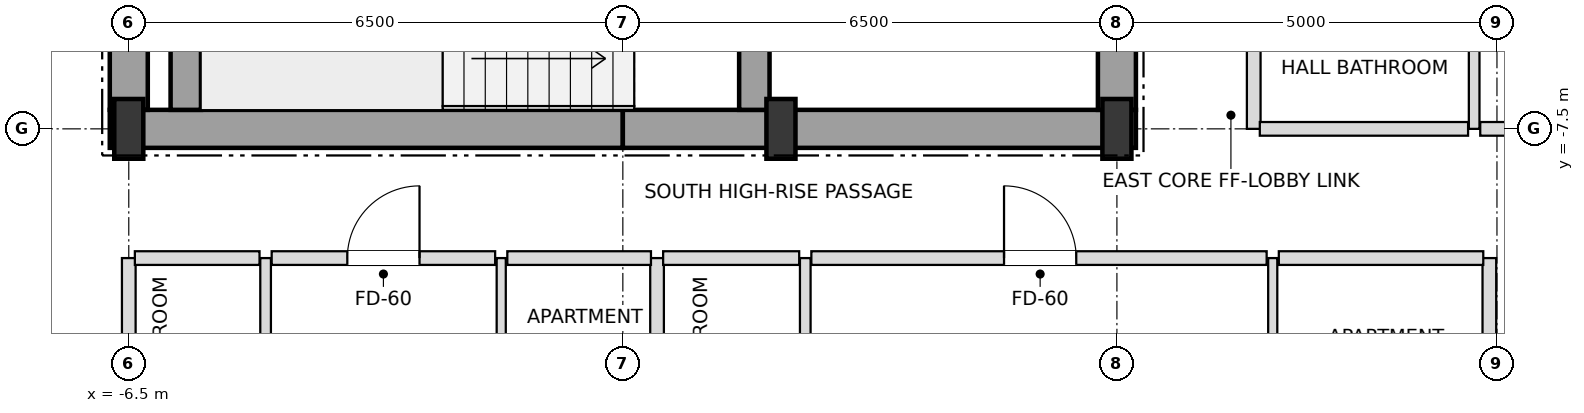
"""IFC4 building model, lengths in metres.
Left out: names, types, materials, properties, quantities, classifications, styles, units other than length and angle.
Written with IfcOpenShell. Run it as: python <this file> out.ifc"""

import sys

from ifc_helpers import new_model, si_unit, direction, frame, frame_2d, origin, origin_2d, place, context, subcontext, project, spatial, rectangle, i_section, extrude, element, fill, save


model = new_model("IFC4")
c1 = context("Model", 3, precision=1e-05, world=origin(), true_north=direction((0.0, 1.0)))
c2 = subcontext(c1, "Body", "Model", "MODEL_VIEW")
j1 = project(units=[si_unit("LENGTHUNIT", "METRE"), si_unit("PLANEANGLEUNIT", "RADIAN")], contexts=[c1])
p1 = place(None, origin())
s1 = spatial("IfcSite", under=j1, at=p1, CompositionType="ELEMENT")
p2 = place(p1, origin())
s2 = spatial("IfcBuilding", under=s1, at=p2, CompositionType="ELEMENT")
p3 = place(p2, frame((0.0, 0.0, 243.9)))
s3 = spatial("IfcBuildingStorey", under=s2, at=p3, CompositionType="ELEMENT", Elevation=243.9)
for number, where, z_axis, x_axis in (
    (1, (-6.5, -7.5, 0.0), (0.0, 0.0, 1.0), (1.0, 0.0, 0.0)),
    (2, (2.08, -7.5, 0.0), (0.0, 0.0, 1.0), (1.0, 0.0, 0.0)),
    (3, (6.5, -7.5, 0.0), (0.0, 0.0, 1.0), (1.0, 0.0, 0.0)),
):
    element("IfcColumn", number, at=place(p3, frame(where, z_axis=z_axis, x_axis=x_axis)), inside=s3, PredefinedType="COLUMN", context=c2, shape_type="SweptSolid", body=[
        extrude(i_section(OverallWidth=0.382, OverallDepth=0.786, WebThickness=0.02, FlangeThickness=0.033, at=origin_2d()), origin(), (0.0, 0.0, 1.0), 3.6),
    ])
for number, where, z_axis, x_axis in (
    (4, (-6.75, -7.5, 0.0), (0.0, 0.0, 1.0), (1.0, 0.0, 0.0)),
    (5, (0.0, -7.5, 0.0), (0.0, 0.0, 1.0), (1.0, 0.0, 0.0)),
):
    element("IfcWall", number, at=place(p3, frame(where, z_axis=z_axis, x_axis=x_axis)), inside=s3, PredefinedType="SHEAR", context=c2, shape_type="SweptSolid", body=[
        extrude(rectangle(XDim=6.75, YDim=0.5, at=frame_2d((3.375, 0.0))), origin(), (0.0, 0.0, 1.0), 3.38),
    ])
p4 = place(p3, frame((-6.5, -7.25, 0.0), z_axis=(0.0, 0.0, 1.0), x_axis=(0.0, 1.0, 0.0)))
e6 = element("IfcWall", 6, at=p4, inside=s3, PredefinedType="SHEAR", context=c2, shape_type="SweptSolid", body=[
    extrude(rectangle(XDim=3.55, YDim=0.5, at=frame_2d((1.775, 0.0))), origin(), (0.0, 0.0, 1.0), 3.38),
])
p5 = place(p3, frame((6.5, -7.25, 0.0), z_axis=(0.0, 0.0, 1.0), x_axis=(0.0, 1.0, 0.0)))
e7 = element("IfcWall", 7, at=p5, inside=s3, PredefinedType="SHEAR", context=c2, shape_type="SweptSolid", body=[
    extrude(rectangle(XDim=5.75, YDim=0.5, at=frame_2d((2.875, 0.0))), origin(), (0.0, 0.0, 1.0), 3.38),
])
p6 = place(p5, frame((0.85, 0.0, 0.0)))
e8 = element("IfcOpeningElement", 8, at=p6, cuts=e7, PredefinedType="OPENING", context=c2, shape_type="SweptSolid", body=[
    extrude(rectangle(XDim=1.05, YDim=2.15, at=frame_2d((0.525, 1.075))), frame((0.0, 0.26, 0.0), z_axis=(0.0, -1.0, 0.0), x_axis=(1.0, 0.0, 0.0)), (0.0, 0.0, 1.0), 0.52),
])
p7 = place(p3, frame((-5.75, -7.25, 0.0), z_axis=(0.0, 0.0, 1.0), x_axis=(0.0, 1.0, 0.0)))
e9 = element("IfcWall", 9, at=p7, inside=s3, PredefinedType="SHEAR", context=c2, shape_type="SweptSolid", body=[
    extrude(rectangle(XDim=2.9, YDim=0.4, at=frame_2d((1.45, 0.0))), origin(), (0.0, 0.0, 1.0), 3.38),
])
p8 = place(p3, frame((1.73, -7.25, 0.0), z_axis=(0.0, 0.0, 1.0), x_axis=(0.0, 1.0, 0.0)))
e10 = element("IfcWall", 10, at=p8, inside=s3, PredefinedType="SHEAR", context=c2, shape_type="SweptSolid", body=[
    extrude(rectangle(XDim=3.3, YDim=0.4, at=frame_2d((1.65, 0.0))), origin(), (0.0, 0.0, 1.0), 3.38),
])
p9 = place(p8, frame((0.9, 0.0, 0.0)))
e11 = element("IfcOpeningElement", 11, at=p9, cuts=e10, PredefinedType="OPENING", context=c2, shape_type="SweptSolid", body=[
    extrude(rectangle(XDim=1.05, YDim=2.15, at=frame_2d((0.525, 1.075))), frame((0.0, 0.21, 0.0), z_axis=(0.0, -1.0, 0.0), x_axis=(1.0, 0.0, 0.0)), (0.0, 0.0, 1.0), 0.42),
])
p10 = place(p3, frame((-6.5, -19.9, 0.0), z_axis=(0.0, 0.0, 1.0), x_axis=(0.0, 1.0, 0.0)))
e12 = element("IfcWall", 12, at=p10, inside=s3, PredefinedType="PARTITIONING", context=c2, shape_type="SweptSolid", body=[
    extrude(rectangle(XDim=10.7, YDim=0.18, at=frame_2d((5.35, 0.0))), origin(), (0.0, 0.0, 1.0), 2.826),
])
p11 = place(p3, frame((-4.7, -13.9, 0.0), z_axis=(0.0, 0.0, 1.0), x_axis=(0.0, 1.0, 0.0)))
e13 = element("IfcWall", 13, at=p11, inside=s3, PredefinedType="PARTITIONING", context=c2, shape_type="SweptSolid", body=[
    extrude(rectangle(XDim=4.7, YDim=0.14, at=frame_2d((2.35, 0.0))), origin(), (0.0, 0.0, 1.0), 3.38),
])
p12 = place(p11, frame((1.9, 0.0, 0.0)))
e14 = element("IfcOpeningElement", 14, at=p12, cuts=e13, PredefinedType="OPENING", context=c2, shape_type="SweptSolid", body=[
    extrude(rectangle(XDim=0.9, YDim=2.1, at=frame_2d((0.45, 1.05))), frame((0.0, 0.08, 0.0), z_axis=(0.0, -1.0, 0.0), x_axis=(1.0, 0.0, 0.0)), (0.0, 0.0, 1.0), 0.16),
])
p13 = place(p3, frame((-1.6, -13.9, 0.0), z_axis=(0.0, 0.0, 1.0), x_axis=(0.0, 1.0, 0.0)))
e15 = element("IfcWall", 15, at=p13, inside=s3, PredefinedType="PARTITIONING", context=c2, shape_type="SweptSolid", body=[
    extrude(rectangle(XDim=4.7, YDim=0.12, at=frame_2d((2.35, 0.0))), origin(), (0.0, 0.0, 1.0), 3.38),
])
p14 = place(p13, frame((1.875, 0.0, 0.0)))
e16 = element("IfcOpeningElement", 16, at=p14, cuts=e15, PredefinedType="OPENING", context=c2, shape_type="SweptSolid", body=[
    extrude(rectangle(XDim=0.95, YDim=2.1, at=frame_2d((0.475, 1.05))), frame((0.0, 0.07, 0.0), z_axis=(0.0, -1.0, 0.0), x_axis=(1.0, 0.0, 0.0)), (0.0, 0.0, 1.0), 0.14),
])
p15 = place(p3, frame((0.45, -19.9, 0.0), z_axis=(0.0, 0.0, 1.0), x_axis=(0.0, 1.0, 0.0)))
e17 = element("IfcWall", 17, at=p15, inside=s3, PredefinedType="PARTITIONING", context=c2, shape_type="SweptSolid", body=[
    extrude(rectangle(XDim=10.7, YDim=0.18, at=frame_2d((5.35, 0.0))), origin(), (0.0, 0.0, 1.0), 3.018),
])
p16 = place(p3, frame((2.4, -13.9, 0.0), z_axis=(0.0, 0.0, 1.0), x_axis=(0.0, 1.0, 0.0)))
e18 = element("IfcWall", 18, at=p16, inside=s3, PredefinedType="PARTITIONING", context=c2, shape_type="SweptSolid", body=[
    extrude(rectangle(XDim=4.7, YDim=0.14, at=frame_2d((2.35, 0.0))), origin(), (0.0, 0.0, 1.0), 3.38),
])
p17 = place(p16, frame((1.9, 0.0, 0.0)))
e19 = element("IfcOpeningElement", 19, at=p17, cuts=e18, PredefinedType="OPENING", context=c2, shape_type="SweptSolid", body=[
    extrude(rectangle(XDim=0.9, YDim=2.1, at=frame_2d((0.45, 1.05))), frame((0.0, 0.08, 0.0), z_axis=(0.0, -1.0, 0.0), x_axis=(1.0, 0.0, 0.0)), (0.0, 0.0, 1.0), 0.16),
])
p18 = place(p3, frame((8.3, -7.5, 0.0), z_axis=(0.0, 0.0, 1.0), x_axis=(0.0, 1.0, 0.0)))
e20 = element("IfcWall", 20, at=p18, inside=s3, PredefinedType="PARTITIONING", context=c2, shape_type="SweptSolid", body=[
    extrude(rectangle(XDim=15.0, YDim=0.18, at=frame_2d((7.5, 0.0))), origin(), (0.0, 0.0, 1.0), 3.38),
])
p19 = place(p18, frame((2.355, 0.0, 0.0)))
e21 = element("IfcOpeningElement", 21, at=p19, cuts=e20, PredefinedType="OPENING", context=c2, shape_type="SweptSolid", body=[
    extrude(rectangle(XDim=0.95, YDim=2.15, at=frame_2d((0.475, 1.075))), frame((0.0, 0.1, 0.0), z_axis=(0.0, -1.0, 0.0), x_axis=(1.0, 0.0, 0.0)), (0.0, 0.0, 1.0), 0.2),
])
p20 = place(p3, frame((8.55, -19.9, 0.0), z_axis=(0.0, 0.0, 1.0), x_axis=(0.0, 1.0, 0.0)))
e22 = element("IfcWall", 22, at=p20, inside=s3, PredefinedType="PARTITIONING", context=c2, shape_type="SweptSolid", body=[
    extrude(rectangle(XDim=10.7, YDim=0.12, at=frame_2d((5.35, 0.0))), origin(), (0.0, 0.0, 1.0), 2.826),
])
p21 = place(p20, frame((7.875, 0.0, 0.0)))
e23 = element("IfcOpeningElement", 23, at=p21, cuts=e22, PredefinedType="OPENING", context=c2, shape_type="SweptSolid", body=[
    extrude(rectangle(XDim=0.95, YDim=2.1, at=frame_2d((0.475, 1.05))), frame((0.0, 0.07, 0.0), z_axis=(0.0, -1.0, 0.0), x_axis=(1.0, 0.0, 0.0)), (0.0, 0.0, 1.0), 0.14),
])
p22 = place(p20, frame((2.55, 0.0, 0.0)))
e24 = element("IfcOpeningElement", 24, at=p22, cuts=e22, PredefinedType="OPENING", context=c2, shape_type="SweptSolid", body=[
    extrude(rectangle(XDim=0.9, YDim=2.1, at=frame_2d((0.45, 1.05))), frame((0.0, 0.07, 0.0), z_axis=(0.0, -1.0, 0.0), x_axis=(1.0, 0.0, 0.0)), (0.0, 0.0, 1.0), 0.14),
])
p23 = place(p3, frame((11.2, -7.5, 0.0), z_axis=(0.0, 0.0, 1.0), x_axis=(0.0, 1.0, 0.0)))
e25 = element("IfcWall", 25, at=p23, inside=s3, PredefinedType="PARTITIONING", context=c2, shape_type="SweptSolid", body=[
    extrude(rectangle(XDim=15.0, YDim=0.14, at=frame_2d((7.5, 0.0))), origin(), (0.0, 0.0, 1.0), 3.38),
])
p24 = place(p23, frame((3.475, 0.0, 0.0)))
e26 = element("IfcOpeningElement", 26, at=p24, cuts=e25, PredefinedType="OPENING", context=c2, shape_type="SweptSolid", body=[
    extrude(rectangle(XDim=0.95, YDim=2.1, at=frame_2d((0.475, 1.05))), frame((0.0, 0.08, 0.0), z_axis=(0.0, -1.0, 0.0), x_axis=(1.0, 0.0, 0.0)), (0.0, 0.0, 1.0), 0.16),
])
p25 = place(p3, frame((11.4, -14.27, 0.0), z_axis=(0.0, 0.0, 1.0), x_axis=(0.0, 1.0, 0.0)))
e27 = element("IfcWall", 27, at=p25, inside=s3, PredefinedType="PARTITIONING", context=c2, shape_type="SweptSolid", body=[
    extrude(rectangle(XDim=5.07, YDim=0.18, at=frame_2d((2.535, 0.0))), origin(), (0.0, 0.0, 1.0), 2.748),
])
p26 = place(p3, frame((-6.42, -9.2, 0.0), z_axis=(0.0, 0.0, 1.0), x_axis=(1.0, 0.0, 0.0)))
e28 = element("IfcWall", 28, at=p26, inside=s3, PredefinedType="PARTITIONING", context=c2, shape_type="SweptSolid", body=[
    extrude(rectangle(XDim=1.64, YDim=0.18, at=frame_2d((0.82, 0.0))), origin(), (0.0, 0.0, 1.0), 3.38),
])
p27 = place(p3, frame((-4.62, -9.2, 0.0), z_axis=(0.0, 0.0, 1.0), x_axis=(1.0, 0.0, 0.0)))
e29 = element("IfcWall", 29, at=p27, inside=s3, PredefinedType="PARTITIONING", context=c2, shape_type="SweptSolid", body=[
    extrude(rectangle(XDim=2.94, YDim=0.18, at=frame_2d((1.47, 0.0))), origin(), (0.0, 0.0, 1.0), 3.38),
])
p28 = place(p27, frame((0.995, 0.0, 0.0)))
e30 = element("IfcOpeningElement", 30, at=p28, cuts=e29, PredefinedType="OPENING", context=c2, shape_type="SweptSolid", body=[
    extrude(rectangle(XDim=0.95, YDim=2.15, at=frame_2d((0.475, 1.075))), frame((0.0, 0.1, 0.0), z_axis=(0.0, -1.0, 0.0), x_axis=(1.0, 0.0, 0.0)), (0.0, 0.0, 1.0), 0.2),
])
p29 = place(p3, frame((-1.52, -9.2, 0.0), z_axis=(0.0, 0.0, 1.0), x_axis=(1.0, 0.0, 0.0)))
e31 = element("IfcWall", 31, at=p29, inside=s3, PredefinedType="PARTITIONING", context=c2, shape_type="SweptSolid", body=[
    extrude(rectangle(XDim=1.89, YDim=0.18, at=frame_2d((0.945, 0.0))), origin(), (0.0, 0.0, 1.0), 3.38),
])
p30 = place(p3, frame((0.53, -9.2, 0.0), z_axis=(0.0, 0.0, 1.0), x_axis=(1.0, 0.0, 0.0)))
e32 = element("IfcWall", 32, at=p30, inside=s3, PredefinedType="PARTITIONING", context=c2, shape_type="SweptSolid", body=[
    extrude(rectangle(XDim=1.79, YDim=0.18, at=frame_2d((0.895, 0.0))), origin(), (0.0, 0.0, 1.0), 3.38),
])
p31 = place(p3, frame((2.48, -9.2, 0.0), z_axis=(0.0, 0.0, 1.0), x_axis=(1.0, 0.0, 0.0)))
e33 = element("IfcWall", 33, at=p31, inside=s3, PredefinedType="PARTITIONING", context=c2, shape_type="SweptSolid", body=[
    extrude(rectangle(XDim=5.99, YDim=0.18, at=frame_2d((2.995, 0.0))), origin(), (0.0, 0.0, 1.0), 2.826),
])
p32 = place(p31, frame((2.535, 0.0, 0.0)))
e34 = element("IfcOpeningElement", 34, at=p32, cuts=e33, PredefinedType="OPENING", context=c2, shape_type="SweptSolid", body=[
    extrude(rectangle(XDim=0.95, YDim=2.15, at=frame_2d((0.475, 1.075))), frame((0.0, 0.1, 0.0), z_axis=(0.0, -1.0, 0.0), x_axis=(1.0, 0.0, 0.0)), (0.0, 0.0, 1.0), 0.2),
])
p33 = place(p3, frame((8.63, -9.2, 0.0), z_axis=(0.0, 0.0, 1.0), x_axis=(1.0, 0.0, 0.0)))
e35 = element("IfcWall", 35, at=p33, inside=s3, PredefinedType="PARTITIONING", context=c2, shape_type="SweptSolid", body=[
    extrude(rectangle(XDim=2.69, YDim=0.18, at=frame_2d((1.345, 0.0))), origin(), (0.0, 0.0, 1.0), 3.38),
])
p34 = place(p3, frame((8.38, -7.5, 0.0), z_axis=(0.0, 0.0, 1.0), x_axis=(1.0, 0.0, 0.0)))
e36 = element("IfcWall", 36, at=p34, inside=s3, PredefinedType="PARTITIONING", context=c2, shape_type="SweptSolid", body=[
    extrude(rectangle(XDim=2.74, YDim=0.18, at=frame_2d((1.37, 0.0))), origin(), (0.0, 0.0, 1.0), 2.826),
])
p35 = place(p3, frame((11.28, -7.5, 0.0), z_axis=(0.0, 0.0, 1.0), x_axis=(1.0, 0.0, 0.0)))
e37 = element("IfcWall", 37, at=p35, inside=s3, PredefinedType="PARTITIONING", context=c2, shape_type="SweptSolid", body=[
    extrude(rectangle(XDim=5.62, YDim=0.18, at=frame_2d((2.81, 0.0))), origin(), (0.0, 0.0, 1.0), 2.826),
])
p36 = place(p28, origin())
e38 = element("IfcDoor", 38, at=p36, inside=s3, OperationType="SINGLE_SWING_RIGHT", PredefinedType="DOOR", context=c2, shape_type="SweptSolid", body=[
    extrude(rectangle(XDim=0.95, YDim=2.15, at=frame_2d((0.475, 1.075))), frame((0.0, 0.025, 0.0), z_axis=(0.0, -1.0, 0.0), x_axis=(1.0, 0.0, 0.0)), (0.0, 0.0, 1.0), 0.05),
])
fill(e30, e38)
p37 = place(p32, origin())
e39 = element("IfcDoor", 39, at=p37, inside=s3, OperationType="SINGLE_SWING_LEFT", PredefinedType="DOOR", context=c2, shape_type="SweptSolid", body=[
    extrude(rectangle(XDim=0.95, YDim=2.15, at=frame_2d((0.475, 1.075))), frame((0.0, 0.025, 0.0), z_axis=(0.0, -1.0, 0.0), x_axis=(1.0, 0.0, 0.0)), (0.0, 0.0, 1.0), 0.05),
])
fill(e34, e39)
save(model, sys.argv[1])
